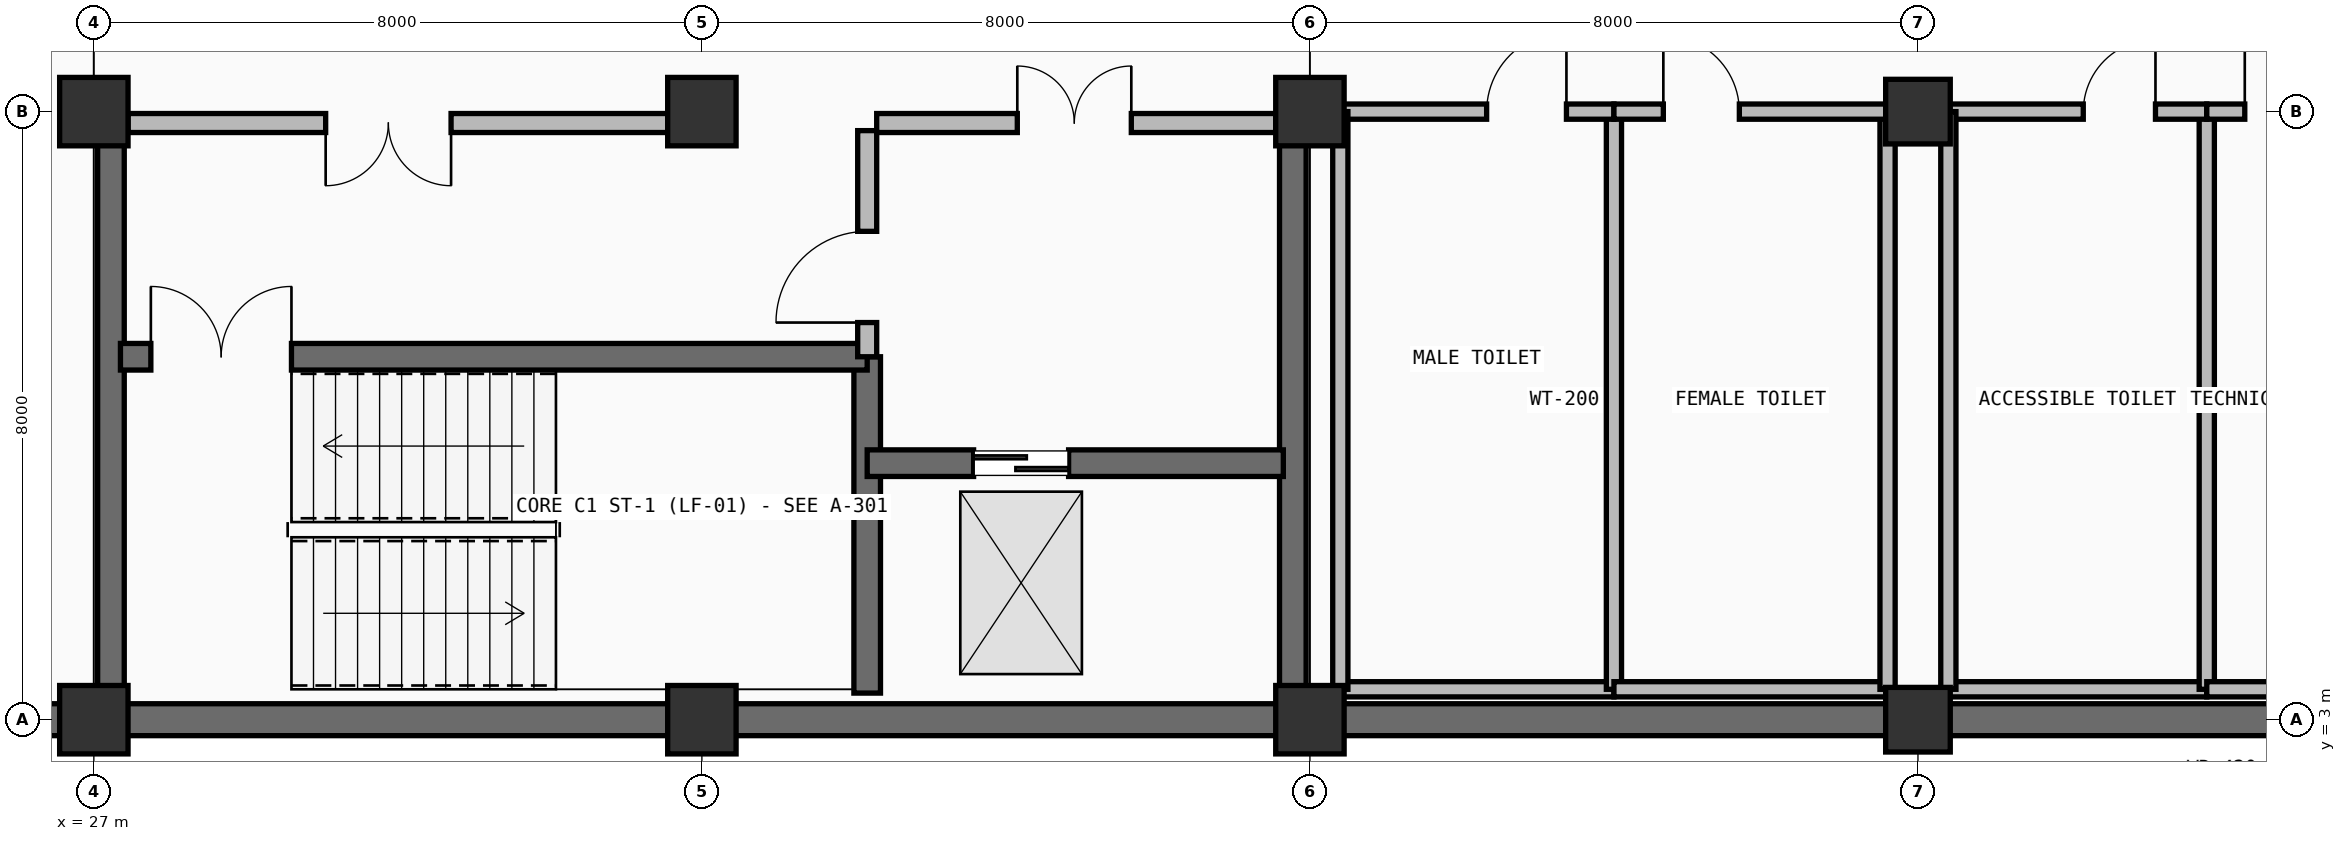
"""IFC4 building model, lengths in metres.
Left out: names, types, materials, properties, quantities, classifications, styles, units other than length and angle.
Written with IfcOpenShell. Run it as: python <this file> out.ifc"""

import sys

from ifc_helpers import new_model, si_unit, direction, frame, frame_2d, origin, origin_2d, place, context, subcontext, project, spatial, rectangle, extrude, element, fill, save


model = new_model("IFC4")
c1 = context("Model", 3, precision=1e-05, world=origin(), true_north=direction((0.0, 1.0)))
c2 = subcontext(c1, "Body", "Model", "MODEL_VIEW")
j1 = project(units=[si_unit("LENGTHUNIT", "METRE"), si_unit("PLANEANGLEUNIT", "RADIAN")], contexts=[c1])
p1 = place(None, origin())
s1 = spatial("IfcSite", under=j1, at=p1, CompositionType="ELEMENT")
p2 = place(p1, origin())
s2 = spatial("IfcBuilding", under=s1, at=p2, CompositionType="ELEMENT")
p3 = place(p2, frame((0.0, 0.0, -4.5)))
s3 = spatial("IfcBuildingStorey", under=s2, at=p3, CompositionType="ELEMENT", Elevation=-4.5)
for number, where, z_axis, x_axis in (
    (1, (27.0, 3.0, -0.6), (0.0, 0.0, 1.0), (1.0, 0.0, 0.0)),
    (2, (27.0, 11.0, -0.6), (0.0, 0.0, 1.0), (1.0, 0.0, 0.0)),
    (3, (35.0, 3.0, -0.6), (0.0, 0.0, 1.0), (1.0, 0.0, 0.0)),
    (4, (35.0, 11.0, -0.6), (0.0, 0.0, 1.0), (1.0, 0.0, 0.0)),
    (5, (43.0, 3.0, -0.6), (0.0, 0.0, 1.0), (1.0, 0.0, 0.0)),
    (6, (43.0, 11.0, -0.6), (0.0, 0.0, 1.0), (1.0, 0.0, 0.0)),
):
    element("IfcColumn", number, at=place(p3, frame(where, z_axis=z_axis, x_axis=x_axis)), inside=s3, PredefinedType="COLUMN", context=c2, shape_type="SweptSolid", body=[
        extrude(rectangle(XDim=0.9, YDim=0.9, at=origin_2d()), origin(), (0.0, 0.0, 1.0), 5.1),
    ])
for number, where, z_axis, x_axis in (
    (7, (51.0, 3.0, -0.6), (0.0, 0.0, 1.0), (1.0, 0.0, 0.0)),
    (8, (51.0, 11.0, -0.6), (0.0, 0.0, 1.0), (1.0, 0.0, 0.0)),
):
    element("IfcColumn", number, at=place(p3, frame(where, z_axis=z_axis, x_axis=x_axis)), inside=s3, PredefinedType="COLUMN", context=c2, shape_type="SweptSolid", body=[
        extrude(rectangle(XDim=0.85, YDim=0.85, at=origin_2d()), origin(), (0.0, 0.0, 1.0), 5.1),
    ])
for number, where, z_axis, x_axis in (
    (9, (59.0, 3.0, 0.0), (0.0, 0.0, 1.0), (-1.0, 0.0, 0.0)),
    (10, (51.0, 3.0, 0.0), (0.0, 0.0, 1.0), (-1.0, 0.0, 0.0)),
    (11, (43.0, 3.0, 0.0), (0.0, 0.0, 1.0), (-1.0, 0.0, 0.0)),
    (12, (35.0, 3.0, 0.0), (0.0, 0.0, 1.0), (-1.0, 0.0, 0.0)),
    (13, (27.0, 3.0, 0.0), (0.0, 0.0, 1.0), (-1.0, 0.0, 0.0)),
):
    element("IfcWall", number, at=place(p3, frame(where, z_axis=z_axis, x_axis=x_axis)), inside=s3, PredefinedType="USERDEFINED", context=c2, shape_type="SweptSolid", body=[
        extrude(rectangle(XDim=8.0, YDim=0.42, at=frame_2d((4.0, 0.0))), origin(), (0.0, 0.0, 1.0), 4.5),
    ])
p4 = place(p3, frame((27.225, 3.2, 0.0), z_axis=(0.0, 0.0, 1.0), x_axis=(0.0, 1.0, 0.0)))
e14 = element("IfcWall", 14, at=p4, inside=s3, PredefinedType="SHEAR", context=c2, shape_type="SweptSolid", body=[
    extrude(rectangle(XDim=7.6, YDim=0.35, at=frame_2d((3.8, 0.0))), origin(), (0.0, 0.0, 1.0), 4.2),
])
p5 = place(p3, frame((37.175, 3.35, 0.0), z_axis=(0.0, 0.0, 1.0), x_axis=(0.0, 1.0, 0.0)))
e15 = element("IfcWall", 15, at=p5, inside=s3, PredefinedType="SHEAR", context=c2, shape_type="SweptSolid", body=[
    extrude(rectangle(XDim=4.425, YDim=0.35, at=frame_2d((2.212, 0.0))), origin(), (0.0, 0.0, 1.0), 4.2),
])
p6 = place(p3, frame((42.775, 3.2, 0.0), z_axis=(0.0, 0.0, 1.0), x_axis=(0.0, 1.0, 0.0)))
e16 = element("IfcWall", 16, at=p6, inside=s3, PredefinedType="SHEAR", context=c2, shape_type="SweptSolid", body=[
    extrude(rectangle(XDim=7.6, YDim=0.35, at=frame_2d((3.8, 0.0))), origin(), (0.0, 0.0, 1.0), 4.2),
])
p7 = place(p3, frame((27.35, 7.775, 0.0), z_axis=(0.0, 0.0, 1.0), x_axis=(1.0, 0.0, 0.0)))
e17 = element("IfcWall", 17, at=p7, inside=s3, PredefinedType="SHEAR", context=c2, shape_type="SweptSolid", body=[
    extrude(rectangle(XDim=9.825, YDim=0.35, at=frame_2d((4.913, 0.0))), origin(), (0.0, 0.0, 1.0), 4.2),
])
p8 = place(p7, frame((0.4, 0.0, 0.0)))
e18 = element("IfcOpeningElement", 18, at=p8, cuts=e17, PredefinedType="OPENING", context=c2, shape_type="SweptSolid", body=[
    extrude(rectangle(XDim=1.85, YDim=2.25, at=frame_2d((0.925, 1.125))), frame((0.0, 0.185, 0.0), z_axis=(0.0, -1.0, 0.0), x_axis=(1.0, 0.0, 0.0)), (0.0, 0.0, 1.0), 0.37),
])
p9 = place(p3, frame((37.175, 6.375, 0.0), z_axis=(0.0, 0.0, 1.0), x_axis=(1.0, 0.0, 0.0)))
e19 = element("IfcWall", 19, at=p9, inside=s3, PredefinedType="SHEAR", context=c2, shape_type="SweptSolid", body=[
    extrude(rectangle(XDim=5.475, YDim=0.35, at=frame_2d((2.737, 0.0))), origin(), (0.0, 0.0, 1.0), 4.2),
])
p10 = place(p9, frame((1.4, 0.0, 0.0)))
e20 = element("IfcOpeningElement", 20, at=p10, cuts=e19, PredefinedType="OPENING", context=c2, shape_type="SweptSolid", body=[
    extrude(rectangle(XDim=1.25, YDim=2.25, at=frame_2d((0.625, 1.125))), frame((0.0, 0.185, 0.0), z_axis=(0.0, -1.0, 0.0), x_axis=(1.0, 0.0, 0.0)), (0.0, 0.0, 1.0), 0.37),
])
p11 = place(p3, frame((37.175, 7.775, 0.0), z_axis=(0.0, 0.0, 1.0), x_axis=(0.0, 1.0, 0.0)))
e21 = element("IfcWall", 21, at=p11, inside=s3, PredefinedType="PARTITIONING", context=c2, shape_type="SweptSolid", body=[
    extrude(rectangle(XDim=2.975, YDim=0.25, at=frame_2d((1.488, 0.0))), origin(), (0.0, 0.0, 1.0), 4.2),
])
p12 = place(p11, frame((0.45, 0.0, 0.0)))
e22 = element("IfcOpeningElement", 22, at=p12, cuts=e21, PredefinedType="OPENING", context=c2, shape_type="SweptSolid", body=[
    extrude(rectangle(XDim=1.2, YDim=2.2, at=frame_2d((0.6, 1.1))), frame((0.0, 0.135, 0.0), z_axis=(0.0, -1.0, 0.0), x_axis=(1.0, 0.0, 0.0)), (0.0, 0.0, 1.0), 0.27),
])
p13 = place(p3, frame((27.45, 10.85, 0.0), z_axis=(0.0, 0.0, 1.0), x_axis=(1.0, 0.0, 0.0)))
e23 = element("IfcWall", 23, at=p13, inside=s3, PredefinedType="PARTITIONING", context=c2, shape_type="SweptSolid", body=[
    extrude(rectangle(XDim=7.1, YDim=0.25, at=frame_2d((3.55, 0.0))), origin(), (0.0, 0.0, 1.0), 3.435),
])
p14 = place(p13, frame((2.6, 0.0, 0.0)))
e24 = element("IfcOpeningElement", 24, at=p14, cuts=e23, PredefinedType="OPENING", context=c2, shape_type="SweptSolid", body=[
    extrude(rectangle(XDim=1.65, YDim=2.25, at=frame_2d((0.825, 1.125))), frame((0.0, 0.135, 0.0), z_axis=(0.0, -1.0, 0.0), x_axis=(1.0, 0.0, 0.0)), (0.0, 0.0, 1.0), 0.27),
])
p15 = place(p3, frame((37.3, 10.85, 0.0), z_axis=(0.0, 0.0, 1.0), x_axis=(1.0, 0.0, 0.0)))
e25 = element("IfcWall", 25, at=p15, inside=s3, PredefinedType="PARTITIONING", context=c2, shape_type="SweptSolid", body=[
    extrude(rectangle(XDim=5.25, YDim=0.25, at=frame_2d((2.625, 0.0))), origin(), (0.0, 0.0, 1.0), 3.435),
])
p16 = place(p15, frame((1.85, 0.0, 0.0)))
e26 = element("IfcOpeningElement", 26, at=p16, cuts=e25, PredefinedType="OPENING", context=c2, shape_type="SweptSolid", body=[
    extrude(rectangle(XDim=1.5, YDim=2.2, at=frame_2d((0.75, 1.1))), frame((0.0, 0.135, 0.0), z_axis=(0.0, -1.0, 0.0), x_axis=(1.0, 0.0, 0.0)), (0.0, 0.0, 1.0), 0.27),
])
p17 = place(p3, frame((43.4, 3.4, 0.0), z_axis=(0.0, 0.0, 1.0), x_axis=(1.0, 0.0, 0.0)))
e27 = element("IfcWall", 27, at=p17, inside=s3, PredefinedType="PARTITIONING", context=c2, shape_type="SweptSolid", body=[
    extrude(rectangle(XDim=3.6, YDim=0.2, at=frame_2d((1.8, 0.0))), origin(), (0.0, 0.0, 1.0), 3.505),
])
p18 = place(p3, frame((47.0, 3.4, 0.0), z_axis=(0.0, 0.0, 1.0), x_axis=(0.0, 1.0, 0.0)))
e28 = element("IfcWall", 28, at=p18, inside=s3, PredefinedType="PARTITIONING", context=c2, shape_type="SweptSolid", body=[
    extrude(rectangle(XDim=7.6, YDim=0.2, at=frame_2d((3.8, 0.0))), origin(), (0.0, 0.0, 1.0), 3.635),
])
p19 = place(p3, frame((43.4, 11.0, 0.0), z_axis=(0.0, 0.0, 1.0), x_axis=(1.0, 0.0, 0.0)))
e29 = element("IfcWall", 29, at=p19, inside=s3, PredefinedType="PARTITIONING", context=c2, shape_type="SweptSolid", body=[
    extrude(rectangle(XDim=3.6, YDim=0.2, at=frame_2d((1.8, 0.0))), origin(), (0.0, 0.0, 1.0), 3.435),
])
p20 = place(p19, frame((1.925, 0.0, 0.0)))
e30 = element("IfcOpeningElement", 30, at=p20, cuts=e29, PredefinedType="OPENING", context=c2, shape_type="SweptSolid", body=[
    extrude(rectangle(XDim=1.05, YDim=2.16, at=frame_2d((0.525, 1.08))), frame((0.0, 0.11, 0.0), z_axis=(0.0, -1.0, 0.0), x_axis=(1.0, 0.0, 0.0)), (0.0, 0.0, 1.0), 0.22),
])
p21 = place(p3, frame((43.4, 3.4, 0.0), z_axis=(0.0, 0.0, 1.0), x_axis=(0.0, 1.0, 0.0)))
e31 = element("IfcWall", 31, at=p21, inside=s3, PredefinedType="PARTITIONING", context=c2, shape_type="SweptSolid", body=[
    extrude(rectangle(XDim=7.6, YDim=0.2, at=frame_2d((3.8, 0.0))), origin(), (0.0, 0.0, 1.0), 3.485),
])
p22 = place(p3, frame((47.0, 3.4, 0.0), z_axis=(0.0, 0.0, 1.0), x_axis=(1.0, 0.0, 0.0)))
e32 = element("IfcWall", 32, at=p22, inside=s3, PredefinedType="PARTITIONING", context=c2, shape_type="SweptSolid", body=[
    extrude(rectangle(XDim=3.6, YDim=0.2, at=frame_2d((1.8, 0.0))), origin(), (0.0, 0.0, 1.0), 3.505),
])
p23 = place(p3, frame((50.6, 3.4, 0.0), z_axis=(0.0, 0.0, 1.0), x_axis=(0.0, 1.0, 0.0)))
e33 = element("IfcWall", 33, at=p23, inside=s3, PredefinedType="PARTITIONING", context=c2, shape_type="SweptSolid", body=[
    extrude(rectangle(XDim=7.6, YDim=0.2, at=frame_2d((3.8, 0.0))), origin(), (0.0, 0.0, 1.0), 3.485),
])
p24 = place(p3, frame((47.0, 11.0, 0.0), z_axis=(0.0, 0.0, 1.0), x_axis=(1.0, 0.0, 0.0)))
e34 = element("IfcWall", 34, at=p24, inside=s3, PredefinedType="PARTITIONING", context=c2, shape_type="SweptSolid", body=[
    extrude(rectangle(XDim=3.6, YDim=0.2, at=frame_2d((1.8, 0.0))), origin(), (0.0, 0.0, 1.0), 3.435),
])
p25 = place(p24, frame((0.65, 0.0, 0.0)))
e35 = element("IfcOpeningElement", 35, at=p25, cuts=e34, PredefinedType="OPENING", context=c2, shape_type="SweptSolid", body=[
    extrude(rectangle(XDim=1.0, YDim=2.15, at=frame_2d((0.5, 1.075))), frame((0.0, 0.11, 0.0), z_axis=(0.0, -1.0, 0.0), x_axis=(1.0, 0.0, 0.0)), (0.0, 0.0, 1.0), 0.22),
])
p26 = place(p3, frame((51.4, 3.4, 0.0), z_axis=(0.0, 0.0, 1.0), x_axis=(1.0, 0.0, 0.0)))
e36 = element("IfcWall", 36, at=p26, inside=s3, PredefinedType="PARTITIONING", context=c2, shape_type="SweptSolid", body=[
    extrude(rectangle(XDim=3.4, YDim=0.2, at=frame_2d((1.7, 0.0))), origin(), (0.0, 0.0, 1.0), 3.505),
])
p27 = place(p3, frame((54.8, 3.4, 0.0), z_axis=(0.0, 0.0, 1.0), x_axis=(0.0, 1.0, 0.0)))
e37 = element("IfcWall", 37, at=p27, inside=s3, PredefinedType="PARTITIONING", context=c2, shape_type="SweptSolid", body=[
    extrude(rectangle(XDim=7.6, YDim=0.2, at=frame_2d((3.8, 0.0))), origin(), (0.0, 0.0, 1.0), 3.635),
])
p28 = place(p3, frame((51.4, 11.0, 0.0), z_axis=(0.0, 0.0, 1.0), x_axis=(1.0, 0.0, 0.0)))
e38 = element("IfcWall", 38, at=p28, inside=s3, PredefinedType="PARTITIONING", context=c2, shape_type="SweptSolid", body=[
    extrude(rectangle(XDim=3.4, YDim=0.2, at=frame_2d((1.7, 0.0))), origin(), (0.0, 0.0, 1.0), 3.435),
])
p29 = place(p28, frame((1.775, 0.0, 0.0)))
e39 = element("IfcOpeningElement", 39, at=p29, cuts=e38, PredefinedType="OPENING", context=c2, shape_type="SweptSolid", body=[
    extrude(rectangle(XDim=0.95, YDim=2.1, at=frame_2d((0.475, 1.05))), frame((0.0, 0.11, 0.0), z_axis=(0.0, -1.0, 0.0), x_axis=(1.0, 0.0, 0.0)), (0.0, 0.0, 1.0), 0.22),
])
p30 = place(p3, frame((51.4, 3.4, 0.0), z_axis=(0.0, 0.0, 1.0), x_axis=(0.0, 1.0, 0.0)))
e40 = element("IfcWall", 40, at=p30, inside=s3, PredefinedType="PARTITIONING", context=c2, shape_type="SweptSolid", body=[
    extrude(rectangle(XDim=7.6, YDim=0.2, at=frame_2d((3.8, 0.0))), origin(), (0.0, 0.0, 1.0), 3.485),
])
p31 = place(p3, frame((54.8, 3.4, 0.0), z_axis=(0.0, 0.0, 1.0), x_axis=(1.0, 0.0, 0.0)))
e41 = element("IfcWall", 41, at=p31, inside=s3, PredefinedType="PARTITIONING", context=c2, shape_type="SweptSolid", body=[
    extrude(rectangle(XDim=3.4, YDim=0.2, at=frame_2d((1.7, 0.0))), origin(), (0.0, 0.0, 1.0), 3.505),
])
p32 = place(p3, frame((54.8, 11.0, 0.0), z_axis=(0.0, 0.0, 1.0), x_axis=(1.0, 0.0, 0.0)))
e42 = element("IfcWall", 42, at=p32, inside=s3, PredefinedType="PARTITIONING", context=c2, shape_type="SweptSolid", body=[
    extrude(rectangle(XDim=3.4, YDim=0.2, at=frame_2d((1.7, 0.0))), origin(), (0.0, 0.0, 1.0), 3.435),
])
p33 = place(p32, frame((0.5, 0.0, 0.0)))
e43 = element("IfcOpeningElement", 43, at=p33, cuts=e42, PredefinedType="OPENING", context=c2, shape_type="SweptSolid", body=[
    extrude(rectangle(XDim=1.3, YDim=2.2, at=frame_2d((0.65, 1.1))), frame((0.0, 0.11, 0.0), z_axis=(0.0, -1.0, 0.0), x_axis=(1.0, 0.0, 0.0)), (0.0, 0.0, 1.0), 0.22),
])
p34 = place(p8, origin())
e44 = element("IfcDoor", 44, at=p34, inside=s3, OperationType="DOUBLE_DOOR_SINGLE_SWING", PredefinedType="DOOR", context=c2, shape_type="SweptSolid", body=[
    extrude(rectangle(XDim=1.85, YDim=2.25, at=frame_2d((0.925, 1.125))), frame((0.0, 0.025, 0.0), z_axis=(0.0, -1.0, 0.0), x_axis=(1.0, 0.0, 0.0)), (0.0, 0.0, 1.0), 0.05),
])
fill(e18, e44)
p35 = place(p10, origin())
e45 = element("IfcDoor", 45, at=p35, inside=s3, OperationType="DOUBLE_DOOR_SLIDING", PredefinedType="DOOR", context=c2, shape_type="SweptSolid", body=[
    extrude(rectangle(XDim=1.25, YDim=2.25, at=frame_2d((0.625, 1.125))), frame((0.0, 0.025, 0.0), z_axis=(0.0, -1.0, 0.0), x_axis=(1.0, 0.0, 0.0)), (0.0, 0.0, 1.0), 0.05),
])
fill(e20, e45)
p36 = place(p12, origin())
e46 = element("IfcDoor", 46, at=p36, inside=s3, OperationType="SINGLE_SWING_LEFT", PredefinedType="DOOR", context=c2, shape_type="SweptSolid", body=[
    extrude(rectangle(XDim=1.2, YDim=2.2, at=frame_2d((0.6, 1.1))), frame((0.0, 0.025, 0.0), z_axis=(0.0, -1.0, 0.0), x_axis=(1.0, 0.0, 0.0)), (0.0, 0.0, 1.0), 0.05),
])
fill(e22, e46)
p37 = place(p14, frame((1.65, 0.0, 0.0), z_axis=(0.0, 0.0, 1.0), x_axis=(-1.0, 0.0, 0.0)))
e47 = element("IfcDoor", 47, at=p37, inside=s3, OperationType="DOUBLE_DOOR_SINGLE_SWING", PredefinedType="DOOR", context=c2, shape_type="SweptSolid", body=[
    extrude(rectangle(XDim=1.65, YDim=2.25, at=frame_2d((0.825, 1.125))), frame((0.0, 0.025, 0.0), z_axis=(0.0, -1.0, 0.0), x_axis=(1.0, 0.0, 0.0)), (0.0, 0.0, 1.0), 0.05),
])
fill(e24, e47)
p38 = place(p16, origin())
e48 = element("IfcDoor", 48, at=p38, inside=s3, OperationType="DOUBLE_DOOR_SINGLE_SWING", PredefinedType="DOOR", context=c2, shape_type="SweptSolid", body=[
    extrude(rectangle(XDim=1.5, YDim=2.2, at=frame_2d((0.75, 1.1))), frame((0.0, 0.025, 0.0), z_axis=(0.0, -1.0, 0.0), x_axis=(1.0, 0.0, 0.0)), (0.0, 0.0, 1.0), 0.05),
])
fill(e26, e48)
p39 = place(p20, origin())
e49 = element("IfcDoor", 49, at=p39, inside=s3, OperationType="SINGLE_SWING_RIGHT", PredefinedType="DOOR", context=c2, shape_type="SweptSolid", body=[
    extrude(rectangle(XDim=1.05, YDim=2.16, at=frame_2d((0.525, 1.08))), frame((0.0, 0.025, 0.0), z_axis=(0.0, -1.0, 0.0), x_axis=(1.0, 0.0, 0.0)), (0.0, 0.0, 1.0), 0.05),
])
fill(e30, e49)
p40 = place(p25, origin())
e50 = element("IfcDoor", 50, at=p40, inside=s3, OperationType="SINGLE_SWING_LEFT", PredefinedType="DOOR", context=c2, shape_type="SweptSolid", body=[
    extrude(rectangle(XDim=1.0, YDim=2.15, at=frame_2d((0.5, 1.075))), frame((0.0, 0.025, 0.0), z_axis=(0.0, -1.0, 0.0), x_axis=(1.0, 0.0, 0.0)), (0.0, 0.0, 1.0), 0.05),
])
fill(e35, e50)
p41 = place(p29, origin())
e51 = element("IfcDoor", 51, at=p41, inside=s3, OperationType="SINGLE_SWING_RIGHT", PredefinedType="DOOR", context=c2, shape_type="SweptSolid", body=[
    extrude(rectangle(XDim=0.95, YDim=2.1, at=frame_2d((0.475, 1.05))), frame((0.0, 0.025, 0.0), z_axis=(0.0, -1.0, 0.0), x_axis=(1.0, 0.0, 0.0)), (0.0, 0.0, 1.0), 0.05),
])
fill(e39, e51)
p42 = place(p33, origin())
e52 = element("IfcDoor", 52, at=p42, inside=s3, OperationType="SINGLE_SWING_LEFT", PredefinedType="DOOR", context=c2, shape_type="SweptSolid", body=[
    extrude(rectangle(XDim=1.3, YDim=2.2, at=frame_2d((0.65, 1.1))), frame((0.0, 0.025, 0.0), z_axis=(0.0, -1.0, 0.0), x_axis=(1.0, 0.0, 0.0)), (0.0, 0.0, 1.0), 0.05),
])
fill(e43, e52)
save(model, sys.argv[1])
